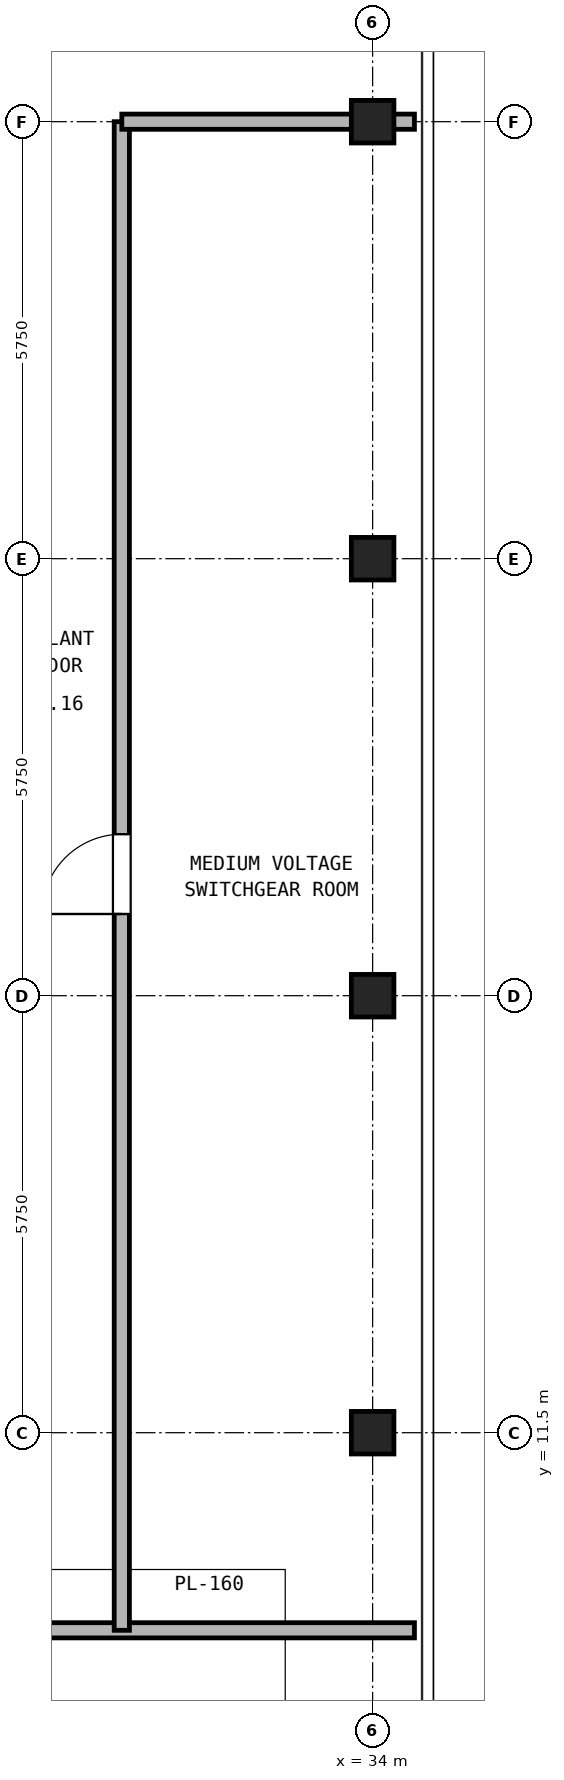
"""IFC4 building model, lengths in metres.
Left out: names, types, materials, properties, quantities, classifications, styles, units other than length and angle.
Written with IfcOpenShell. Run it as: python <this file> out.ifc"""

import sys

from ifc_helpers import new_model, si_unit, direction, frame, frame_2d, origin, origin_2d, place, context, subcontext, project, spatial, rectangle, hollow_rectangle, extrude, source, transform, mapped, element, fill, save


model = new_model("IFC4")
c1 = context("Model", 3, precision=1e-05, world=origin(), true_north=direction((0.0, 1.0)))
c2 = subcontext(c1, "Body", "Model", "MODEL_VIEW")
j1 = project(units=[si_unit("LENGTHUNIT", "METRE"), si_unit("PLANEANGLEUNIT", "RADIAN")], contexts=[c1])
p1 = place(None, origin())
s1 = spatial("IfcSite", under=j1, at=p1, CompositionType="ELEMENT")
p2 = place(p1, origin())
s2 = spatial("IfcBuilding", under=s1, at=p2, CompositionType="ELEMENT")
p3 = place(p2, frame((0.0, 0.0, 292.9)))
s3 = spatial("IfcBuildingStorey", under=s2, at=p3, CompositionType="ELEMENT", Elevation=292.9)
m1 = source(origin(), c2, "Body", "SweptSolid", [
    extrude(hollow_rectangle(XDim=0.56, YDim=0.56, WallThickness=0.03, at=origin_2d()), origin(), (0.0, 0.0, 1.0), 3.312),
])
for number, where, z_axis, x_axis in (
    (1, (34.0, 11.5, 0.0), (0.0, 0.0, 1.0), (1.0, 0.0, 0.0)),
    (2, (34.0, 17.25, 0.0), (0.0, 0.0, 1.0), (1.0, 0.0, 0.0)),
    (3, (34.0, 23.0, 0.0), (0.0, 0.0, 1.0), (1.0, 0.0, 0.0)),
    (4, (34.0, 28.75, 0.0), (0.0, 0.0, 1.0), (1.0, 0.0, 0.0)),
):
    element("IfcColumn", number, at=place(p3, frame(where, z_axis=z_axis, x_axis=x_axis)), inside=s3, PredefinedType="COLUMN", context=c2, shape_type="MappedRepresentation", body=[
        mapped(m1, transform((0.0, 0.0, 0.0), x_axis=(1.0, 0.0, 0.0), y_axis=(0.0, 1.0, 0.0), z_axis=(0.0, 0.0, 1.0), scale=1.0)),
    ])
p4 = place(p3, frame((12.45, 8.9, 0.0), z_axis=(0.0, 0.0, 1.0), x_axis=(1.0, 0.0, 0.0)))
e5 = element("IfcWall", 5, at=p4, inside=s3, PredefinedType="PARTITIONING", context=c2, shape_type="SweptSolid", body=[
    extrude(rectangle(XDim=22.1, YDim=0.2, at=frame_2d((11.05, 0.0))), origin(), (0.0, 0.0, 1.0), 3.34),
])
p5 = place(p4, frame((6.95, 0.0, 0.0)))
e6 = element("IfcOpeningElement", 6, at=p5, cuts=e5, PredefinedType="OPENING", context=c2, shape_type="SweptSolid", body=[
    extrude(rectangle(XDim=1.5, YDim=2.25, at=frame_2d((0.75, 1.125))), frame((0.0, 0.11, 0.0), z_axis=(0.0, -1.0, 0.0), x_axis=(1.0, 0.0, 0.0)), (0.0, 0.0, 1.0), 0.22),
])
p6 = place(p4, frame((14.15, 0.0, 0.0)))
e7 = element("IfcOpeningElement", 7, at=p6, cuts=e5, PredefinedType="OPENING", context=c2, shape_type="SweptSolid", body=[
    extrude(rectangle(XDim=1.5, YDim=2.25, at=frame_2d((0.75, 1.125))), frame((0.0, 0.11, 0.0), z_axis=(0.0, -1.0, 0.0), x_axis=(1.0, 0.0, 0.0)), (0.0, 0.0, 1.0), 0.22),
])
p7 = place(p3, frame((30.7, 8.9, 0.0), z_axis=(0.0, 0.0, 1.0), x_axis=(0.0, 1.0, 0.0)))
e8 = element("IfcWall", 8, at=p7, inside=s3, PredefinedType="PARTITIONING", context=c2, shape_type="SweptSolid", body=[
    extrude(rectangle(XDim=19.85, YDim=0.2, at=frame_2d((9.925, 0.0))), origin(), (0.0, 0.0, 1.0), 3.34),
])
p8 = place(p7, frame((9.425, 0.0, 0.0)))
e9 = element("IfcOpeningElement", 9, at=p8, cuts=e8, PredefinedType="OPENING", context=c2, shape_type="SweptSolid", body=[
    extrude(rectangle(XDim=1.05, YDim=2.15, at=frame_2d((0.525, 1.075))), frame((0.0, 0.11, 0.0), z_axis=(0.0, -1.0, 0.0), x_axis=(1.0, 0.0, 0.0)), (0.0, 0.0, 1.0), 0.22),
])
p9 = place(p3, frame((30.7, 28.75, 0.0), z_axis=(0.0, 0.0, 1.0), x_axis=(1.0, 0.0, 0.0)))
e10 = element("IfcWall", 10, at=p9, inside=s3, PredefinedType="PARTITIONING", context=c2, shape_type="SweptSolid", body=[
    extrude(rectangle(XDim=3.85, YDim=0.2, at=frame_2d((1.925, 0.0))), origin(), (0.0, 0.0, 1.0), 2.865),
])
p10 = place(p8, origin())
e11 = element("IfcDoor", 11, at=p10, inside=s3, OperationType="SINGLE_SWING_LEFT", PredefinedType="DOOR", context=c2, shape_type="SweptSolid", body=[
    extrude(rectangle(XDim=1.05, YDim=2.15, at=frame_2d((0.525, 1.075))), frame((0.0, 0.025, 0.0), z_axis=(0.0, -1.0, 0.0), x_axis=(1.0, 0.0, 0.0)), (0.0, 0.0, 1.0), 0.05),
])
fill(e9, e11)
save(model, sys.argv[1])
